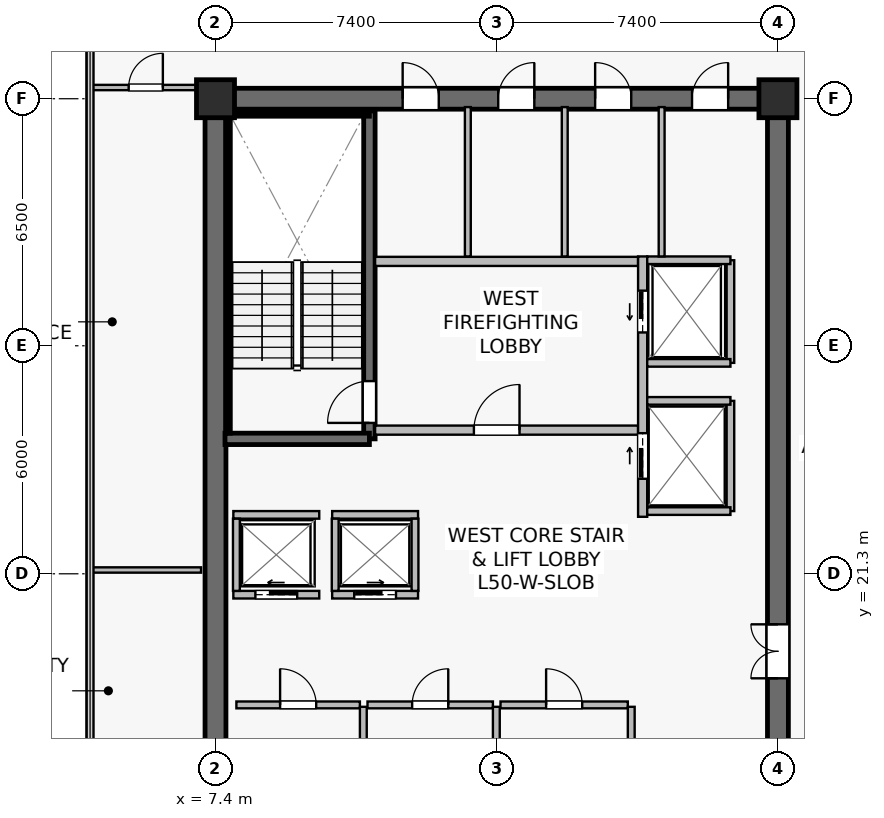
"""IFC4 building model, lengths in metres.
Left out: names, types, materials, properties, quantities, classifications, styles, units other than length and angle.
Written with IfcOpenShell. Run it as: python <this file> out.ifc"""

import sys

from ifc_helpers import new_model, si_unit, direction, frame, frame_2d, origin, origin_2d, place, context, subcontext, project, spatial, rectangle, extrude, source, transform, mapped, element, fill, save


model = new_model("IFC4")
c1 = context("Model", 3, precision=1e-05, world=origin(), true_north=direction((0.0, 1.0)))
c2 = subcontext(c1, "Body", "Model", "MODEL_VIEW")
j1 = project(units=[si_unit("LENGTHUNIT", "METRE"), si_unit("PLANEANGLEUNIT", "RADIAN")], contexts=[c1])
p1 = place(None, origin())
s1 = spatial("IfcSite", under=j1, at=p1, CompositionType="ELEMENT")
p2 = place(p1, origin())
s2 = spatial("IfcBuilding", under=s1, at=p2, CompositionType="ELEMENT")
p3 = place(p2, frame((0.0, 0.0, 209.6)))
s3 = spatial("IfcBuildingStorey", under=s2, at=p3, CompositionType="ELEMENT", Elevation=209.6)
p4 = place(p3, frame((7.125, 33.8, 0.0), z_axis=(0.0, 0.0, 1.0), x_axis=(1.0, 0.0, 0.0)))
e1 = element("IfcWall", 1, at=p4, inside=s3, PredefinedType="SHEAR", context=c2, shape_type="SweptSolid", body=[
    extrude(rectangle(XDim=15.35, YDim=0.55, at=frame_2d((7.675, 0.0))), origin(), (0.0, 0.0, 1.0), 3.8),
])
p5 = place(p4, frame((5.2, 0.0, 0.0)))
e2 = element("IfcOpeningElement", 2, at=p5, cuts=e1, PredefinedType="OPENING", context=c2, shape_type="SweptSolid", body=[
    extrude(rectangle(XDim=0.95, YDim=2.15, at=frame_2d((0.475, 1.075))), frame((0.0, 0.285, 0.0), z_axis=(0.0, -1.0, 0.0), x_axis=(1.0, 0.0, 0.0)), (0.0, 0.0, 1.0), 0.57),
])
p6 = place(p4, frame((7.715, 0.0, 0.0)))
e3 = element("IfcOpeningElement", 3, at=p6, cuts=e1, PredefinedType="OPENING", context=c2, shape_type="SweptSolid", body=[
    extrude(rectangle(XDim=0.95, YDim=2.15, at=frame_2d((0.475, 1.075))), frame((0.0, 0.285, 0.0), z_axis=(0.0, -1.0, 0.0), x_axis=(1.0, 0.0, 0.0)), (0.0, 0.0, 1.0), 0.57),
])
p7 = place(p4, frame((10.265, 0.0, 0.0)))
e4 = element("IfcOpeningElement", 4, at=p7, cuts=e1, PredefinedType="OPENING", context=c2, shape_type="SweptSolid", body=[
    extrude(rectangle(XDim=0.95, YDim=2.15, at=frame_2d((0.475, 1.075))), frame((0.0, 0.285, 0.0), z_axis=(0.0, -1.0, 0.0), x_axis=(1.0, 0.0, 0.0)), (0.0, 0.0, 1.0), 0.57),
])
p8 = place(p4, frame((12.815, 0.0, 0.0)))
e5 = element("IfcOpeningElement", 5, at=p8, cuts=e1, PredefinedType="OPENING", context=c2, shape_type="SweptSolid", body=[
    extrude(rectangle(XDim=0.95, YDim=2.15, at=frame_2d((0.475, 1.075))), frame((0.0, 0.285, 0.0), z_axis=(0.0, -1.0, 0.0), x_axis=(1.0, 0.0, 0.0)), (0.0, 0.0, 1.0), 0.57),
])
p9 = place(p3, frame((7.4, 15.075, 0.0), z_axis=(0.0, 0.0, 1.0), x_axis=(0.0, 1.0, 0.0)))
e6 = element("IfcWall", 6, at=p9, inside=s3, PredefinedType="SHEAR", context=c2, shape_type="SweptSolid", body=[
    extrude(rectangle(XDim=18.45, YDim=0.55, at=frame_2d((9.225, 0.0))), origin(), (0.0, 0.0, 1.0), 3.8),
])
p10 = place(p3, frame((22.2, 15.075, 0.0), z_axis=(0.0, 0.0, 1.0), x_axis=(0.0, 1.0, 0.0)))
e7 = element("IfcWall", 7, at=p10, inside=s3, PredefinedType="SHEAR", context=c2, shape_type="SweptSolid", body=[
    extrude(rectangle(XDim=18.45, YDim=0.55, at=frame_2d((9.225, 0.0))), origin(), (0.0, 0.0, 1.0), 3.8),
])
p11 = place(p10, frame((3.475, 0.0, 0.0)))
e8 = element("IfcOpeningElement", 8, at=p11, cuts=e7, PredefinedType="OPENING", context=c2, shape_type="SweptSolid", body=[
    extrude(rectangle(XDim=1.42, YDim=2.2, at=frame_2d((0.71, 1.1))), frame((0.0, 0.285, 0.0), z_axis=(0.0, -1.0, 0.0), x_axis=(1.0, 0.0, 0.0)), (0.0, 0.0, 1.0), 0.57),
])
p12 = place(p3, frame((11.45, 24.85, 0.0), z_axis=(0.0, 0.0, 1.0), x_axis=(0.0, 1.0, 0.0)))
e9 = element("IfcWall", 9, at=p12, inside=s3, PredefinedType="SHEAR", context=c2, shape_type="SweptSolid", body=[
    extrude(rectangle(XDim=8.63, YDim=0.3, at=frame_2d((4.315, 0.0))), origin(), (0.0, 0.0, 1.0), 3.8),
])
p13 = place(p12, frame((0.42, 0.0, 0.0)))
e10 = element("IfcOpeningElement", 10, at=p13, cuts=e9, PredefinedType="OPENING", context=c2, shape_type="SweptSolid", body=[
    extrude(rectangle(XDim=1.1, YDim=2.15, at=frame_2d((0.55, 1.075))), frame((0.0, 0.16, 0.0), z_axis=(0.0, -1.0, 0.0), x_axis=(1.0, 0.0, 0.0)), (0.0, 0.0, 1.0), 0.32),
])
p14 = place(p3, frame((7.65, 24.85, 0.0), z_axis=(0.0, 0.0, 1.0), x_axis=(1.0, 0.0, 0.0)))
e11 = element("IfcWall", 11, at=p14, inside=s3, PredefinedType="SHEAR", context=c2, shape_type="SweptSolid", body=[
    extrude(rectangle(XDim=3.8, YDim=0.3, at=frame_2d((1.9, 0.0))), origin(), (0.0, 0.0, 1.0), 3.8),
])
p15 = place(p3, frame((7.73, 33.4, 0.0), z_axis=(0.0, 0.0, 1.0), x_axis=(1.0, 0.0, 0.0)))
e12 = element("IfcWall", 12, at=p15, inside=s3, PredefinedType="SOLIDWALL", context=c2, shape_type="SweptSolid", body=[
    extrude(rectangle(XDim=3.72, YDim=0.12, at=frame_2d((1.86, 0.0))), origin(), (0.0, 0.0, 1.0), 3.8),
])
p16 = place(p3, frame((7.73, 25.0, 0.0), z_axis=(0.0, 0.0, 1.0), x_axis=(0.0, 1.0, 0.0)))
e13 = element("IfcWall", 13, at=p16, inside=s3, PredefinedType="SOLIDWALL", context=c2, shape_type="SweptSolid", body=[
    extrude(rectangle(XDim=8.32, YDim=0.12, at=frame_2d((4.16, 0.0))), origin(), (0.0, 0.0, 1.0), 3.8),
])
m1 = source(origin(), c2, "Body", "SweptSolid", [
    extrude(rectangle(XDim=1.0, YDim=1.0, at=origin_2d()), origin(), (0.0, 0.0, 1.0), 4.1),
])
for number, where, z_axis, x_axis in (
    (14, (7.4, 33.8, 0.0), (0.0, 0.0, 1.0), (1.0, 0.0, 0.0)),
    (15, (22.2, 33.8, 0.0), (0.0, 0.0, 1.0), (1.0, 0.0, 0.0)),
):
    element("IfcColumn", number, at=place(p3, frame(where, z_axis=z_axis, x_axis=x_axis)), inside=s3, PredefinedType="COLUMN", context=c2, shape_type="MappedRepresentation", body=[
        mapped(m1, transform((0.0, 0.0, 0.0), scale=1.0)),
    ])
p17 = place(p3, frame((11.6, 25.08, 0.0), z_axis=(0.0, 0.0, 1.0), x_axis=(1.0, 0.0, 0.0)))
e16 = element("IfcWall", 16, at=p17, inside=s3, PredefinedType="SOLIDWALL", context=c2, shape_type="SweptSolid", body=[
    extrude(rectangle(XDim=6.92, YDim=0.24, at=frame_2d((3.46, 0.0))), origin(), (0.0, 0.0, 1.0), 3.197),
])
p18 = place(p17, frame((2.6, 0.0, 0.0)))
e17 = element("IfcOpeningElement", 17, at=p18, cuts=e16, PredefinedType="OPENING", context=c2, shape_type="SweptSolid", body=[
    extrude(rectangle(XDim=1.2, YDim=2.16, at=frame_2d((0.6, 1.08))), frame((0.0, 0.13, 0.0), z_axis=(0.0, -1.0, 0.0), x_axis=(1.0, 0.0, 0.0)), (0.0, 0.0, 1.0), 0.26),
])
p19 = place(p3, frame((11.6, 29.52, 0.0), z_axis=(0.0, 0.0, 1.0), x_axis=(1.0, 0.0, 0.0)))
e18 = element("IfcWall", 18, at=p19, inside=s3, PredefinedType="SOLIDWALL", context=c2, shape_type="SweptSolid", body=[
    extrude(rectangle(XDim=6.92, YDim=0.24, at=frame_2d((3.46, 0.0))), origin(), (0.0, 0.0, 1.0), 3.197),
])
p20 = place(p3, frame((18.64, 22.8, 0.0), z_axis=(0.0, 0.0, 1.0), x_axis=(0.0, 1.0, 0.0)))
e19 = element("IfcWall", 19, at=p20, inside=s3, PredefinedType="SOLIDWALL", context=c2, shape_type="SweptSolid", body=[
    extrude(rectangle(XDim=6.85, YDim=0.24, at=frame_2d((3.425, 0.0))), origin(), (0.0, 0.0, 1.0), 2.935),
])
p21 = place(p20, frame((4.85, 0.0, 0.0)))
e20 = element("IfcOpeningElement", 20, at=p21, cuts=e19, PredefinedType="OPENING", context=c2, shape_type="SweptSolid", body=[
    extrude(rectangle(XDim=1.1, YDim=2.22, at=frame_2d((0.55, 1.11))), frame((0.0, 0.13, 0.0), z_axis=(0.0, -1.0, 0.0), x_axis=(1.0, 0.0, 0.0)), (0.0, 0.0, 1.0), 0.26),
])
p22 = place(p20, frame((1.0, 0.0, 0.0)))
e21 = element("IfcOpeningElement", 21, at=p22, cuts=e19, PredefinedType="OPENING", context=c2, shape_type="SweptSolid", body=[
    extrude(rectangle(XDim=1.2, YDim=2.22, at=frame_2d((0.6, 1.11))), frame((0.0, 0.13, 0.0), z_axis=(0.0, -1.0, 0.0), x_axis=(1.0, 0.0, 0.0)), (0.0, 0.0, 1.0), 0.26),
])
p23 = place(p3, frame((7.87, 20.75, 0.0), z_axis=(0.0, 0.0, 1.0), x_axis=(1.0, 0.0, 0.0)))
e22 = element("IfcWall", 22, at=p23, inside=s3, PredefinedType="SOLIDWALL", context=c2, shape_type="SweptSolid", body=[
    extrude(rectangle(XDim=2.26, YDim=0.2, at=frame_2d((1.13, 0.0))), origin(), (0.0, 0.0, 1.0), 3.8),
])
p24 = place(p23, frame((0.58, 0.0, 0.0)))
e23 = element("IfcOpeningElement", 23, at=p24, cuts=e22, PredefinedType="OPENING", context=c2, shape_type="SweptSolid", body=[
    extrude(rectangle(XDim=1.1, YDim=2.22, at=frame_2d((0.55, 1.11))), frame((0.0, 0.11, 0.0), z_axis=(0.0, -1.0, 0.0), x_axis=(1.0, 0.0, 0.0)), (0.0, 0.0, 1.0), 0.22),
])
p25 = place(p3, frame((7.87, 22.85, 0.0), z_axis=(0.0, 0.0, 1.0), x_axis=(1.0, 0.0, 0.0)))
e24 = element("IfcWall", 24, at=p25, inside=s3, PredefinedType="SOLIDWALL", context=c2, shape_type="SweptSolid", body=[
    extrude(rectangle(XDim=2.26, YDim=0.2, at=frame_2d((1.13, 0.0))), origin(), (0.0, 0.0, 1.0), 3.8),
])
p26 = place(p3, frame((7.95, 20.85, 0.0), z_axis=(0.0, 0.0, 1.0), x_axis=(0.0, 1.0, 0.0)))
e25 = element("IfcWall", 25, at=p26, inside=s3, PredefinedType="SOLIDWALL", context=c2, shape_type="SweptSolid", body=[
    extrude(rectangle(XDim=1.9, YDim=0.18, at=frame_2d((0.95, 0.0))), origin(), (0.0, 0.0, 1.0), 3.8),
])
p27 = place(p3, frame((10.47, 20.75, 0.0), z_axis=(0.0, 0.0, 1.0), x_axis=(1.0, 0.0, 0.0)))
e26 = element("IfcWall", 26, at=p27, inside=s3, PredefinedType="SOLIDWALL", context=c2, shape_type="SweptSolid", body=[
    extrude(rectangle(XDim=2.26, YDim=0.2, at=frame_2d((1.13, 0.0))), origin(), (0.0, 0.0, 1.0), 3.8),
])
p28 = place(p27, frame((0.58, 0.0, 0.0)))
e27 = element("IfcOpeningElement", 27, at=p28, cuts=e26, PredefinedType="OPENING", context=c2, shape_type="SweptSolid", body=[
    extrude(rectangle(XDim=1.1, YDim=2.22, at=frame_2d((0.55, 1.11))), frame((0.0, 0.11, 0.0), z_axis=(0.0, -1.0, 0.0), x_axis=(1.0, 0.0, 0.0)), (0.0, 0.0, 1.0), 0.22),
])
p29 = place(p3, frame((10.47, 22.85, 0.0), z_axis=(0.0, 0.0, 1.0), x_axis=(1.0, 0.0, 0.0)))
e28 = element("IfcWall", 28, at=p29, inside=s3, PredefinedType="SOLIDWALL", context=c2, shape_type="SweptSolid", body=[
    extrude(rectangle(XDim=2.26, YDim=0.2, at=frame_2d((1.13, 0.0))), origin(), (0.0, 0.0, 1.0), 3.8),
])
for number, where, z_axis, x_axis in (
    (29, (10.55, 20.85, 0.0), (0.0, 0.0, 1.0), (0.0, 1.0, 0.0)),
    (30, (12.65, 20.85, 0.0), (0.0, 0.0, 1.0), (0.0, 1.0, 0.0)),
):
    element("IfcWall", number, at=place(p3, frame(where, z_axis=z_axis, x_axis=x_axis)), inside=s3, PredefinedType="SOLIDWALL", context=c2, shape_type="SweptSolid", body=[
        extrude(rectangle(XDim=1.9, YDim=0.18, at=frame_2d((0.95, 0.0))), origin(), (0.0, 0.0, 1.0), 3.8),
    ])
p30 = place(p3, frame((20.95, 26.85, 0.0), z_axis=(0.0, 0.0, 1.0), x_axis=(0.0, 1.0, 0.0)))
e31 = element("IfcWall", 31, at=p30, inside=s3, PredefinedType="SOLIDWALL", context=c2, shape_type="SweptSolid", body=[
    extrude(rectangle(XDim=2.7, YDim=0.2, at=frame_2d((1.35, 0.0))), origin(), (0.0, 0.0, 1.0), 3.8),
])
p31 = place(p3, frame((18.76, 29.55, 0.0), z_axis=(0.0, 0.0, 1.0), x_axis=(1.0, 0.0, 0.0)))
e32 = element("IfcWall", 32, at=p31, inside=s3, PredefinedType="SOLIDWALL", context=c2, shape_type="SweptSolid", body=[
    extrude(rectangle(XDim=2.19, YDim=0.2, at=frame_2d((1.095, 0.0))), origin(), (0.0, 0.0, 1.0), 3.8),
])
p32 = place(p3, frame((18.76, 26.85, 0.0), z_axis=(0.0, 0.0, 1.0), x_axis=(1.0, 0.0, 0.0)))
e33 = element("IfcWall", 33, at=p32, inside=s3, PredefinedType="SOLIDWALL", context=c2, shape_type="SweptSolid", body=[
    extrude(rectangle(XDim=2.19, YDim=0.2, at=frame_2d((1.095, 0.0))), origin(), (0.0, 0.0, 1.0), 3.197),
])
p33 = place(p3, frame((20.95, 22.95, 0.0), z_axis=(0.0, 0.0, 1.0), x_axis=(0.0, 1.0, 0.0)))
e34 = element("IfcWall", 34, at=p33, inside=s3, PredefinedType="SOLIDWALL", context=c2, shape_type="SweptSolid", body=[
    extrude(rectangle(XDim=2.9, YDim=0.2, at=frame_2d((1.45, 0.0))), origin(), (0.0, 0.0, 1.0), 2.935),
])
for number, where, z_axis, x_axis in (
    (35, (18.76, 25.85, 0.0), (0.0, 0.0, 1.0), (1.0, 0.0, 0.0)),
    (36, (18.76, 22.95, 0.0), (0.0, 0.0, 1.0), (1.0, 0.0, 0.0)),
):
    element("IfcWall", number, at=place(p3, frame(where, z_axis=z_axis, x_axis=x_axis)), inside=s3, PredefinedType="SOLIDWALL", context=c2, shape_type="SweptSolid", body=[
        extrude(rectangle(XDim=2.19, YDim=0.2, at=frame_2d((1.095, 0.0))), origin(), (0.0, 0.0, 1.0), 3.8),
    ])
p34 = place(p3, frame((7.95, 17.85, 0.0), z_axis=(0.0, 0.0, 1.0), x_axis=(1.0, 0.0, 0.0)))
e37 = element("IfcWall", 37, at=p34, inside=s3, PredefinedType="SOLIDWALL", context=c2, shape_type="SweptSolid", body=[
    extrude(rectangle(XDim=3.25, YDim=0.18, at=frame_2d((1.625, 0.0))), origin(), (0.0, 0.0, 1.0), 3.8),
])
p35 = place(p34, frame((1.15, 0.0, 0.0)))
e38 = element("IfcOpeningElement", 38, at=p35, cuts=e37, PredefinedType="OPENING", context=c2, shape_type="SweptSolid", body=[
    extrude(rectangle(XDim=0.95, YDim=2.15, at=frame_2d((0.475, 1.075))), frame((0.0, 0.1, 0.0), z_axis=(0.0, -1.0, 0.0), x_axis=(1.0, 0.0, 0.0)), (0.0, 0.0, 1.0), 0.2),
])
p36 = place(p3, frame((11.29, 15.4, 0.0), z_axis=(0.0, 0.0, 1.0), x_axis=(0.0, 1.0, 0.0)))
e39 = element("IfcWall", 39, at=p36, inside=s3, PredefinedType="SOLIDWALL", context=c2, shape_type="SweptSolid", body=[
    extrude(rectangle(XDim=2.4, YDim=0.18, at=frame_2d((1.2, 0.0))), origin(), (0.0, 0.0, 1.0), 3.8),
])
p37 = place(p3, frame((11.4, 17.85, 0.0), z_axis=(0.0, 0.0, 1.0), x_axis=(1.0, 0.0, 0.0)))
e40 = element("IfcWall", 40, at=p37, inside=s3, PredefinedType="SOLIDWALL", context=c2, shape_type="SweptSolid", body=[
    extrude(rectangle(XDim=3.3, YDim=0.18, at=frame_2d((1.65, 0.0))), origin(), (0.0, 0.0, 1.0), 3.197),
])
p38 = place(p37, frame((1.175, 0.0, 0.0)))
e41 = element("IfcOpeningElement", 41, at=p38, cuts=e40, PredefinedType="OPENING", context=c2, shape_type="SweptSolid", body=[
    extrude(rectangle(XDim=0.95, YDim=2.15, at=frame_2d((0.475, 1.075))), frame((0.0, 0.1, 0.0), z_axis=(0.0, -1.0, 0.0), x_axis=(1.0, 0.0, 0.0)), (0.0, 0.0, 1.0), 0.2),
])
p39 = place(p3, frame((14.79, 15.4, 0.0), z_axis=(0.0, 0.0, 1.0), x_axis=(0.0, 1.0, 0.0)))
e42 = element("IfcWall", 42, at=p39, inside=s3, PredefinedType="SOLIDWALL", context=c2, shape_type="SweptSolid", body=[
    extrude(rectangle(XDim=2.4, YDim=0.18, at=frame_2d((1.2, 0.0))), origin(), (0.0, 0.0, 1.0), 3.197),
])
p40 = place(p3, frame((14.9, 17.85, 0.0), z_axis=(0.0, 0.0, 1.0), x_axis=(1.0, 0.0, 0.0)))
e43 = element("IfcWall", 43, at=p40, inside=s3, PredefinedType="SOLIDWALL", context=c2, shape_type="SweptSolid", body=[
    extrude(rectangle(XDim=3.35, YDim=0.18, at=frame_2d((1.675, 0.0))), origin(), (0.0, 0.0, 1.0), 3.197),
])
p41 = place(p40, frame((1.2, 0.0, 0.0)))
e44 = element("IfcOpeningElement", 44, at=p41, cuts=e43, PredefinedType="OPENING", context=c2, shape_type="SweptSolid", body=[
    extrude(rectangle(XDim=0.95, YDim=2.15, at=frame_2d((0.475, 1.075))), frame((0.0, 0.1, 0.0), z_axis=(0.0, -1.0, 0.0), x_axis=(1.0, 0.0, 0.0)), (0.0, 0.0, 1.0), 0.2),
])
p42 = place(p3, frame((18.34, 15.4, 0.0), z_axis=(0.0, 0.0, 1.0), x_axis=(0.0, 1.0, 0.0)))
e45 = element("IfcWall", 45, at=p42, inside=s3, PredefinedType="SOLIDWALL", context=c2, shape_type="SweptSolid", body=[
    extrude(rectangle(XDim=2.4, YDim=0.18, at=frame_2d((1.2, 0.0))), origin(), (0.0, 0.0, 1.0), 3.8),
])
for number, where, z_axis, x_axis in (
    (46, (14.04, 29.65, 0.0), (0.0, 0.0, 1.0), (0.0, 1.0, 0.0)),
    (47, (16.59, 29.65, 0.0), (0.0, 0.0, 1.0), (0.0, 1.0, 0.0)),
    (48, (19.14, 29.65, 0.0), (0.0, 0.0, 1.0), (0.0, 1.0, 0.0)),
):
    element("IfcWall", number, at=place(p3, frame(where, z_axis=z_axis, x_axis=x_axis)), inside=s3, PredefinedType="PLUMBINGWALL", context=c2, shape_type="SweptSolid", body=[
        extrude(rectangle(XDim=3.93, YDim=0.155, at=frame_2d((1.965, 0.0))), origin(), (0.0, 0.0, 1.0), 3.8),
    ])
p43 = place(p3, frame((4.11, 21.4, 0.0), z_axis=(0.0, 0.0, 1.0), x_axis=(1.0, 0.0, 0.0)))
e49 = element("IfcWall", 49, at=p43, inside=s3, PredefinedType="PARTITIONING", context=c2, shape_type="SweptSolid", body=[
    extrude(rectangle(XDim=2.91, YDim=0.14, at=frame_2d((1.455, 0.0))), origin(), (0.0, 0.0, 1.0), 3.8),
])
p44 = place(p3, frame((4.11, 34.095, 0.0), z_axis=(0.0, 0.0, 1.0), x_axis=(1.0, 0.0, 0.0)))
e50 = element("IfcWall", 50, at=p44, inside=s3, PredefinedType="PARTITIONING", context=c2, shape_type="SweptSolid", body=[
    extrude(rectangle(XDim=2.91, YDim=0.14, at=frame_2d((1.455, 0.0))), origin(), (0.0, 0.0, 1.0), 3.8),
])
p45 = place(p44, frame((1.005, 0.0, 0.0)))
e51 = element("IfcOpeningElement", 51, at=p45, cuts=e50, PredefinedType="OPENING", context=c2, shape_type="SweptSolid", body=[
    extrude(rectangle(XDim=0.9, YDim=2.1, at=frame_2d((0.45, 1.05))), frame((0.0, 0.08, 0.0), z_axis=(0.0, -1.0, 0.0), x_axis=(1.0, 0.0, 0.0)), (0.0, 0.0, 1.0), 0.16),
])
m2 = source(origin(), c2, "Body", "SweptSolid", [
    extrude(rectangle(XDim=1.1, YDim=2.15, at=frame_2d((0.55, 1.075))), frame((0.0, 0.025, 0.0), z_axis=(0.0, -1.0, 0.0), x_axis=(1.0, 0.0, 0.0)), (0.0, 0.0, 1.0), 0.05),
])
p46 = place(p13, origin())
e52 = element("IfcDoor", 52, at=p46, inside=s3, OperationType="SINGLE_SWING_LEFT", PredefinedType="DOOR", context=c2, shape_type="MappedRepresentation", body=[
    mapped(m2, transform((0.0, 0.0, 0.0), scale=1.0)),
])
fill(e10, e52)
m3 = source(origin(), c2, "Body", "SweptSolid", [
    extrude(rectangle(XDim=1.2, YDim=2.16, at=frame_2d((0.6, 1.08))), frame((0.0, 0.025, 0.0), z_axis=(0.0, -1.0, 0.0), x_axis=(1.0, 0.0, 0.0)), (0.0, 0.0, 1.0), 0.05),
])
p47 = place(p18, origin())
e53 = element("IfcDoor", 53, at=p47, inside=s3, OperationType="SINGLE_SWING_RIGHT", PredefinedType="DOOR", context=c2, shape_type="MappedRepresentation", body=[
    mapped(m3, transform((0.0, 0.0, 0.0), scale=1.0)),
])
fill(e17, e53)
m4 = source(origin(), c2, "Body", "SweptSolid", [
    extrude(rectangle(XDim=1.1, YDim=2.22, at=frame_2d((0.55, 1.11))), frame((0.0, 0.025, 0.0), z_axis=(0.0, -1.0, 0.0), x_axis=(1.0, 0.0, 0.0)), (0.0, 0.0, 1.0), 0.05),
])
p48 = place(p24, origin())
e54 = element("IfcDoor", 54, at=p48, inside=s3, OperationType="SLIDING_TO_LEFT", PredefinedType="USERDEFINED", context=c2, shape_type="MappedRepresentation", body=[
    mapped(m4, transform((0.0, 0.0, 0.0), scale=1.0)),
])
fill(e23, e54)
p49 = place(p28, origin())
e55 = element("IfcDoor", 55, at=p49, inside=s3, OperationType="SLIDING_TO_RIGHT", PredefinedType="USERDEFINED", context=c2, shape_type="MappedRepresentation", body=[
    mapped(m4, transform((0.0, 0.0, 0.0), scale=1.0)),
])
fill(e27, e55)
p50 = place(p21, origin())
e56 = element("IfcDoor", 56, at=p50, inside=s3, OperationType="SLIDING_TO_LEFT", PredefinedType="USERDEFINED", context=c2, shape_type="MappedRepresentation", body=[
    mapped(m4, transform((0.0, 0.0, 0.0), scale=1.0)),
])
fill(e20, e56)
m5 = source(origin(), c2, "Body", "SweptSolid", [
    extrude(rectangle(XDim=1.2, YDim=2.22, at=frame_2d((0.6, 1.11))), frame((0.0, 0.025, 0.0), z_axis=(0.0, -1.0, 0.0), x_axis=(1.0, 0.0, 0.0)), (0.0, 0.0, 1.0), 0.05),
])
p51 = place(p22, origin())
e57 = element("IfcDoor", 57, at=p51, inside=s3, OperationType="SLIDING_TO_RIGHT", PredefinedType="USERDEFINED", context=c2, shape_type="MappedRepresentation", body=[
    mapped(m5, transform((0.0, 0.0, 0.0), scale=1.0)),
])
fill(e21, e57)
m6 = source(origin(), c2, "Body", "SweptSolid", [
    extrude(rectangle(XDim=0.95, YDim=2.15, at=frame_2d((0.475, 1.075))), frame((0.0, 0.025, 0.0), z_axis=(0.0, -1.0, 0.0), x_axis=(1.0, 0.0, 0.0)), (0.0, 0.0, 1.0), 0.05),
])
p52 = place(p35, origin())
e58 = element("IfcDoor", 58, at=p52, inside=s3, OperationType="SINGLE_SWING_LEFT", PredefinedType="DOOR", context=c2, shape_type="MappedRepresentation", body=[
    mapped(m6, transform((0.0, 0.0, 0.0), scale=1.0)),
])
fill(e38, e58)
p53 = place(p38, origin())
e59 = element("IfcDoor", 59, at=p53, inside=s3, OperationType="SINGLE_SWING_RIGHT", PredefinedType="DOOR", context=c2, shape_type="MappedRepresentation", body=[
    mapped(m6, transform((0.0, 0.0, 0.0), scale=1.0)),
])
fill(e41, e59)
p54 = place(p41, origin())
e60 = element("IfcDoor", 60, at=p54, inside=s3, OperationType="SINGLE_SWING_LEFT", PredefinedType="DOOR", context=c2, shape_type="MappedRepresentation", body=[
    mapped(m6, transform((0.0, 0.0, 0.0), scale=1.0)),
])
fill(e44, e60)
m7 = source(origin(), c2, "Body", "SweptSolid", [
    extrude(rectangle(XDim=1.42, YDim=2.2, at=frame_2d((0.71, 1.1))), frame((0.0, 0.025, 0.0), z_axis=(0.0, -1.0, 0.0), x_axis=(1.0, 0.0, 0.0)), (0.0, 0.0, 1.0), 0.05),
])
p55 = place(p11, origin())
e61 = element("IfcDoor", 61, at=p55, inside=s3, OperationType="DOUBLE_DOOR_SINGLE_SWING", PredefinedType="DOOR", context=c2, shape_type="MappedRepresentation", body=[
    mapped(m7, transform((0.0, 0.0, 0.0), scale=1.0)),
])
fill(e8, e61)
p56 = place(p5, origin())
e62 = element("IfcDoor", 62, at=p56, inside=s3, OperationType="SINGLE_SWING_LEFT", PredefinedType="DOOR", context=c2, shape_type="MappedRepresentation", body=[
    mapped(m6, transform((0.0, 0.0, 0.0), scale=1.0)),
])
fill(e2, e62)
p57 = place(p6, origin())
e63 = element("IfcDoor", 63, at=p57, inside=s3, OperationType="SINGLE_SWING_RIGHT", PredefinedType="DOOR", context=c2, shape_type="MappedRepresentation", body=[
    mapped(m6, transform((0.0, 0.0, 0.0), scale=1.0)),
])
fill(e3, e63)
p58 = place(p7, origin())
e64 = element("IfcDoor", 64, at=p58, inside=s3, OperationType="SINGLE_SWING_LEFT", PredefinedType="DOOR", context=c2, shape_type="MappedRepresentation", body=[
    mapped(m6, transform((0.0, 0.0, 0.0), scale=1.0)),
])
fill(e4, e64)
p59 = place(p8, origin())
e65 = element("IfcDoor", 65, at=p59, inside=s3, OperationType="SINGLE_SWING_RIGHT", PredefinedType="DOOR", context=c2, shape_type="MappedRepresentation", body=[
    mapped(m6, transform((0.0, 0.0, 0.0), scale=1.0)),
])
fill(e5, e65)
m8 = source(origin(), c2, "Body", "SweptSolid", [
    extrude(rectangle(XDim=0.9, YDim=2.1, at=frame_2d((0.45, 1.05))), frame((0.0, 0.025, 0.0), z_axis=(0.0, -1.0, 0.0), x_axis=(1.0, 0.0, 0.0)), (0.0, 0.0, 1.0), 0.05),
])
p60 = place(p45, origin())
e66 = element("IfcDoor", 66, at=p60, inside=s3, OperationType="SINGLE_SWING_RIGHT", PredefinedType="DOOR", context=c2, shape_type="MappedRepresentation", body=[
    mapped(m8, transform((0.0, 0.0, 0.0), scale=1.0)),
])
fill(e51, e66)
save(model, sys.argv[1])
